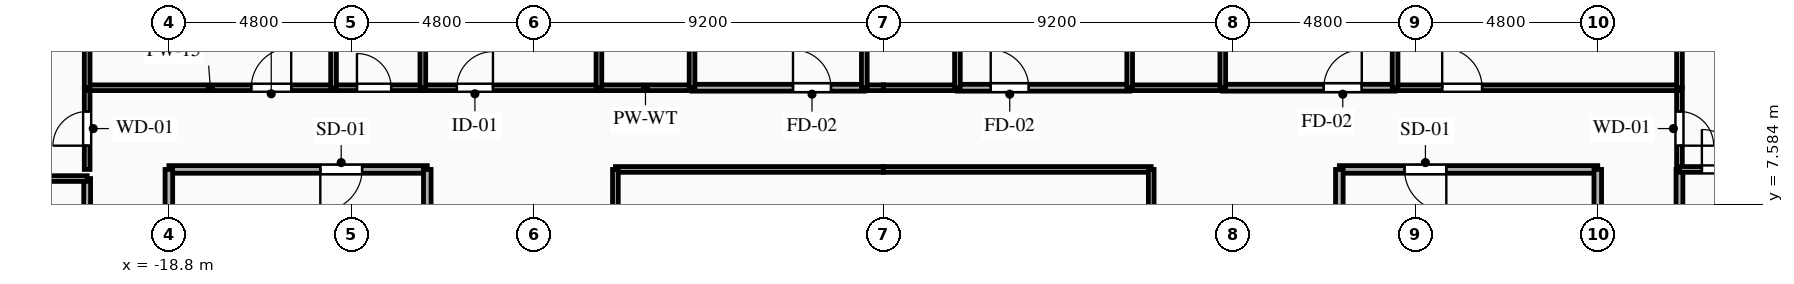
"""IFC4 building model, lengths in metres.
Left out: names, types, materials, properties, quantities, classifications, styles, units other than length and angle.
Written with IfcOpenShell. Run it as: python <this file> out.ifc"""

import sys

from ifc_helpers import new_model, si_unit, direction, frame, frame_2d, origin, place, context, subcontext, project, spatial, rectangle, extrude, element, fill, save


model = new_model("IFC4")
c1 = context("Model", 3, precision=1e-05, world=origin(), true_north=direction((0.0, 1.0)))
c2 = subcontext(c1, "Body", "Model", "MODEL_VIEW")
j1 = project(units=[si_unit("LENGTHUNIT", "METRE"), si_unit("PLANEANGLEUNIT", "RADIAN")], contexts=[c1])
p1 = place(None, origin())
s1 = spatial("IfcSite", under=j1, at=p1, CompositionType="ELEMENT")
p2 = place(p1, origin())
s2 = spatial("IfcBuilding", under=s1, at=p2, CompositionType="ELEMENT")
p3 = place(p2, frame((0.0, 0.0, 161.15)))
s3 = spatial("IfcBuildingStorey", under=s2, at=p3, CompositionType="ELEMENT", Elevation=161.15)
p4 = place(p3, frame((-12.0, 8.5, 0.0), z_axis=(0.0, 0.0, 1.0), x_axis=(-1.0, 0.0, 0.0)))
e1 = element("IfcWall", 1, at=p4, inside=s3, PredefinedType="PARTITIONING", context=c2, shape_type="SweptSolid", body=[
    extrude(rectangle(XDim=6.8, YDim=0.2, at=frame_2d((3.4, 0.0))), origin(), (0.0, 0.0, 1.0), 3.04),
])
p5 = place(p4, frame((1.715, 0.0, 0.0)))
e2 = element("IfcOpeningElement", 2, at=p5, cuts=e1, PredefinedType="OPENING", context=c2, shape_type="SweptSolid", body=[
    extrude(rectangle(XDim=1.1, YDim=2.15, at=frame_2d((0.55, 1.075))), frame((0.0, 0.11, 0.0), z_axis=(0.0, -1.0, 0.0), x_axis=(1.0, 0.0, 0.0)), (0.0, 0.0, 1.0), 0.22),
])
p6 = place(p3, frame((-18.8, 8.5, 0.0), z_axis=(0.0, 0.0, 1.0), x_axis=(0.0, -1.0, 0.0)))
e3 = element("IfcWall", 3, at=p6, inside=s3, PredefinedType="PARTITIONING", context=c2, shape_type="SweptSolid", body=[
    extrude(rectangle(XDim=2.9, YDim=0.2, at=frame_2d((1.45, 0.0))), origin(), (0.0, 0.0, 1.0), 2.525),
])
p7 = place(p3, frame((-12.0, 5.6, 0.0), z_axis=(0.0, 0.0, 1.0), x_axis=(0.0, 1.0, 0.0)))
e4 = element("IfcWall", 4, at=p7, inside=s3, PredefinedType="PARTITIONING", context=c2, shape_type="SweptSolid", body=[
    extrude(rectangle(XDim=2.9, YDim=0.2, at=frame_2d((1.45, 0.0))), origin(), (0.0, 0.0, 1.0), 3.04),
])
p8 = place(p3, frame((18.8, 8.5, 0.0), z_axis=(0.0, 0.0, 1.0), x_axis=(-1.0, 0.0, 0.0)))
e5 = element("IfcWall", 5, at=p8, inside=s3, PredefinedType="PARTITIONING", context=c2, shape_type="SweptSolid", body=[
    extrude(rectangle(XDim=6.8, YDim=0.2, at=frame_2d((3.4, 0.0))), origin(), (0.0, 0.0, 1.0), 3.04),
])
p9 = place(p8, frame((3.985, 0.0, 0.0)))
e6 = element("IfcOpeningElement", 6, at=p9, cuts=e5, PredefinedType="OPENING", context=c2, shape_type="SweptSolid", body=[
    extrude(rectangle(XDim=1.1, YDim=2.15, at=frame_2d((0.55, 1.075))), frame((0.0, 0.11, 0.0), z_axis=(0.0, -1.0, 0.0), x_axis=(1.0, 0.0, 0.0)), (0.0, 0.0, 1.0), 0.22),
])
p10 = place(p3, frame((18.8, 5.6, 0.0), z_axis=(0.0, 0.0, 1.0), x_axis=(0.0, 1.0, 0.0)))
e7 = element("IfcWall", 7, at=p10, inside=s3, PredefinedType="PARTITIONING", context=c2, shape_type="SweptSolid", body=[
    extrude(rectangle(XDim=2.9, YDim=0.2, at=frame_2d((1.45, 0.0))), origin(), (0.0, 0.0, 1.0), 2.525),
])
p11 = place(p3, frame((12.0, 8.5, 0.0), z_axis=(0.0, 0.0, 1.0), x_axis=(0.0, -1.0, 0.0)))
e8 = element("IfcWall", 8, at=p11, inside=s3, PredefinedType="PARTITIONING", context=c2, shape_type="SweptSolid", body=[
    extrude(rectangle(XDim=2.9, YDim=0.2, at=frame_2d((1.45, 0.0))), origin(), (0.0, 0.0, 1.0), 3.04),
])
p12 = place(p3, frame((-20.95, 8.5, 0.0), z_axis=(0.0, 0.0, 1.0), x_axis=(0.0, 1.0, 0.0)))
e9 = element("IfcWall", 9, at=p12, inside=s3, PredefinedType="PARTITIONING", context=c2, shape_type="SweptSolid", body=[
    extrude(rectangle(XDim=2.15, YDim=0.15, at=frame_2d((1.075, 0.0))), origin(), (0.0, 0.0, 1.0), 3.04),
])
p13 = place(p12, frame((0.625, 0.0, 0.0)))
e10 = element("IfcOpeningElement", 10, at=p13, cuts=e9, PredefinedType="OPENING", context=c2, shape_type="SweptSolid", body=[
    extrude(rectangle(XDim=0.9, YDim=2.1, at=frame_2d((0.45, 1.05))), frame((0.0, 0.085, 0.0), z_axis=(0.0, -1.0, 0.0), x_axis=(1.0, 0.0, 0.0)), (0.0, 0.0, 1.0), 0.17),
])
p14 = place(p3, frame((-20.95, 10.65, 0.0), z_axis=(0.0, 0.0, 1.0), x_axis=(1.0, 0.0, 0.0)))
e11 = element("IfcWall", 11, at=p14, inside=s3, PredefinedType="PARTITIONING", context=c2, shape_type="SweptSolid", body=[
    extrude(rectangle(XDim=6.483, YDim=0.15, at=frame_2d((3.241, 0.0))), origin(), (0.0, 0.0, 1.0), 3.04),
])
p15 = place(p14, frame((4.319, 0.0, 0.0)))
e12 = element("IfcOpeningElement", 12, at=p15, cuts=e11, PredefinedType="OPENING", context=c2, shape_type="SweptSolid", body=[
    extrude(rectangle(XDim=1.05, YDim=2.15, at=frame_2d((0.525, 1.075))), frame((0.0, 0.085, 0.0), z_axis=(0.0, -1.0, 0.0), x_axis=(1.0, 0.0, 0.0)), (0.0, 0.0, 1.0), 0.17),
])
p16 = place(p3, frame((-14.467, 10.65, 0.0), z_axis=(0.0, 0.0, 1.0), x_axis=(1.0, 0.0, 0.0)))
e13 = element("IfcWall", 13, at=p16, inside=s3, PredefinedType="PLUMBINGWALL", context=c2, shape_type="SweptSolid", body=[
    extrude(rectangle(XDim=2.35, YDim=0.15, at=frame_2d((1.175, 0.0))), origin(), (0.0, 0.0, 1.0), 3.04),
])
p17 = place(p16, frame((0.616, 0.0, 0.0)))
e14 = element("IfcOpeningElement", 14, at=p17, cuts=e13, PredefinedType="OPENING", context=c2, shape_type="SweptSolid", body=[
    extrude(rectangle(XDim=0.9, YDim=2.1, at=frame_2d((0.45, 1.05))), frame((0.0, 0.085, 0.0), z_axis=(0.0, -1.0, 0.0), x_axis=(1.0, 0.0, 0.0)), (0.0, 0.0, 1.0), 0.17),
])
p18 = place(p3, frame((-12.117, 10.65, 0.0), z_axis=(0.0, 0.0, 1.0), x_axis=(1.0, 0.0, 0.0)))
e15 = element("IfcWall", 15, at=p18, inside=s3, PredefinedType="PARTITIONING", context=c2, shape_type="SweptSolid", body=[
    extrude(rectangle(XDim=4.634, YDim=0.15, at=frame_2d((2.317, 0.0))), origin(), (0.0, 0.0, 1.0), 3.04),
])
p19 = place(p18, frame((0.896, 0.0, 0.0)))
e16 = element("IfcOpeningElement", 16, at=p19, cuts=e15, PredefinedType="OPENING", context=c2, shape_type="SweptSolid", body=[
    extrude(rectangle(XDim=0.95, YDim=2.1, at=frame_2d((0.475, 1.05))), frame((0.0, 0.085, 0.0), z_axis=(0.0, -1.0, 0.0), x_axis=(1.0, 0.0, 0.0)), (0.0, 0.0, 1.0), 0.17),
])
p20 = place(p3, frame((-5.033, 10.65, 0.0), z_axis=(0.0, 0.0, 1.0), x_axis=(1.0, 0.0, 0.0)))
e17 = element("IfcWall", 17, at=p20, inside=s3, PredefinedType="PARTITIONING", context=c2, shape_type="SweptSolid", body=[
    extrude(rectangle(XDim=4.533, YDim=0.18, at=frame_2d((2.267, 0.0))), origin(), (0.0, 0.0, 1.0), 3.04),
])
p21 = place(p20, frame((2.656, 0.0, 0.0)))
e18 = element("IfcOpeningElement", 18, at=p21, cuts=e17, PredefinedType="OPENING", context=c2, shape_type="SweptSolid", body=[
    extrude(rectangle(XDim=1.0, YDim=2.15, at=frame_2d((0.5, 1.075))), frame((0.0, 0.1, 0.0), z_axis=(0.0, -1.0, 0.0), x_axis=(1.0, 0.0, 0.0)), (0.0, 0.0, 1.0), 0.2),
])
p22 = place(p3, frame((-7.483, 10.65, 0.0), z_axis=(0.0, 0.0, 1.0), x_axis=(1.0, 0.0, 0.0)))
e19 = element("IfcWall", 19, at=p22, inside=s3, PredefinedType="PLUMBINGWALL", context=c2, shape_type="SweptSolid", body=[
    extrude(rectangle(XDim=2.45, YDim=0.15, at=frame_2d((1.225, 0.0))), origin(), (0.0, 0.0, 1.0), 3.04),
])
p23 = place(p3, frame((-0.5, 10.65, 0.0), z_axis=(0.0, 0.0, 1.0), x_axis=(1.0, 0.0, 0.0)))
e20 = element("IfcWall", 20, at=p23, inside=s3, PredefinedType="PLUMBINGWALL", context=c2, shape_type="SweptSolid", body=[
    extrude(rectangle(XDim=0.5, YDim=0.15, at=frame_2d((0.25, 0.0))), origin(), (0.0, 0.0, 1.0), 3.04),
])
p24 = place(p3, frame((0.0, 8.5, 0.0), z_axis=(0.0, 0.0, 1.0), x_axis=(-1.0, 0.0, 0.0)))
e21 = element("IfcWall", 21, at=p24, inside=s3, PredefinedType="PARTITIONING", context=c2, shape_type="SweptSolid", body=[
    extrude(rectangle(XDim=7.05, YDim=0.15, at=frame_2d((3.525, 0.0))), origin(), (0.0, 0.0, 1.0), 3.04),
])
p25 = place(p3, frame((20.95, 10.65, 0.0), z_axis=(0.0, 0.0, 1.0), x_axis=(0.0, -1.0, 0.0)))
e22 = element("IfcWall", 22, at=p25, inside=s3, PredefinedType="PARTITIONING", context=c2, shape_type="SweptSolid", body=[
    extrude(rectangle(XDim=2.15, YDim=0.15, at=frame_2d((1.075, 0.0))), origin(), (0.0, 0.0, 1.0), 3.04),
])
p26 = place(p25, frame((0.625, 0.0, 0.0)))
e23 = element("IfcOpeningElement", 23, at=p26, cuts=e22, PredefinedType="OPENING", context=c2, shape_type="SweptSolid", body=[
    extrude(rectangle(XDim=0.9, YDim=2.1, at=frame_2d((0.45, 1.05))), frame((0.0, 0.085, 0.0), z_axis=(0.0, -1.0, 0.0), x_axis=(1.0, 0.0, 0.0)), (0.0, 0.0, 1.0), 0.17),
])
p27 = place(p3, frame((1.95, 10.65, 0.0), z_axis=(0.0, 0.0, 1.0), x_axis=(1.0, 0.0, 0.0)))
e24 = element("IfcWall", 24, at=p27, inside=s3, PredefinedType="PARTITIONING", context=c2, shape_type="SweptSolid", body=[
    extrude(rectangle(XDim=4.533, YDim=0.18, at=frame_2d((2.267, 0.0))), origin(), (0.0, 0.0, 1.0), 3.04),
])
p28 = place(p27, frame((0.877, 0.0, 0.0)))
e25 = element("IfcOpeningElement", 25, at=p28, cuts=e24, PredefinedType="OPENING", context=c2, shape_type="SweptSolid", body=[
    extrude(rectangle(XDim=1.0, YDim=2.15, at=frame_2d((0.5, 1.075))), frame((0.0, 0.1, 0.0), z_axis=(0.0, -1.0, 0.0), x_axis=(1.0, 0.0, 0.0)), (0.0, 0.0, 1.0), 0.2),
])
p29 = place(p3, frame((0.0, 10.65, 0.0), z_axis=(0.0, 0.0, 1.0), x_axis=(1.0, 0.0, 0.0)))
e26 = element("IfcWall", 26, at=p29, inside=s3, PredefinedType="PLUMBINGWALL", context=c2, shape_type="SweptSolid", body=[
    extrude(rectangle(XDim=1.95, YDim=0.15, at=frame_2d((0.975, 0.0))), origin(), (0.0, 0.0, 1.0), 3.04),
])
p30 = place(p3, frame((8.933, 10.65, 0.0), z_axis=(0.0, 0.0, 1.0), x_axis=(1.0, 0.0, 0.0)))
e27 = element("IfcWall", 27, at=p30, inside=s3, PredefinedType="PARTITIONING", context=c2, shape_type="SweptSolid", body=[
    extrude(rectangle(XDim=4.534, YDim=0.18, at=frame_2d((2.267, 0.0))), origin(), (0.0, 0.0, 1.0), 3.04),
])
p31 = place(p30, frame((2.657, 0.0, 0.0)))
e28 = element("IfcOpeningElement", 28, at=p31, cuts=e27, PredefinedType="OPENING", context=c2, shape_type="SweptSolid", body=[
    extrude(rectangle(XDim=1.0, YDim=2.15, at=frame_2d((0.5, 1.075))), frame((0.0, 0.1, 0.0), z_axis=(0.0, -1.0, 0.0), x_axis=(1.0, 0.0, 0.0)), (0.0, 0.0, 1.0), 0.2),
])
p32 = place(p3, frame((6.483, 10.65, 0.0), z_axis=(0.0, 0.0, 1.0), x_axis=(1.0, 0.0, 0.0)))
e29 = element("IfcWall", 29, at=p32, inside=s3, PredefinedType="PLUMBINGWALL", context=c2, shape_type="SweptSolid", body=[
    extrude(rectangle(XDim=2.45, YDim=0.15, at=frame_2d((1.225, 0.0))), origin(), (0.0, 0.0, 1.0), 3.04),
])
p33 = place(p3, frame((13.467, 10.65, 0.0), z_axis=(0.0, 0.0, 1.0), x_axis=(1.0, 0.0, 0.0)))
e30 = element("IfcWall", 30, at=p33, inside=s3, PredefinedType="PARTITIONING", context=c2, shape_type="SweptSolid", body=[
    extrude(rectangle(XDim=7.483, YDim=0.15, at=frame_2d((3.741, 0.0))), origin(), (0.0, 0.0, 1.0), 3.04),
])
p34 = place(p33, frame((1.239, 0.0, 0.0)))
e31 = element("IfcOpeningElement", 31, at=p34, cuts=e30, PredefinedType="OPENING", context=c2, shape_type="SweptSolid", body=[
    extrude(rectangle(XDim=1.05, YDim=2.15, at=frame_2d((0.525, 1.075))), frame((0.0, 0.085, 0.0), z_axis=(0.0, -1.0, 0.0), x_axis=(1.0, 0.0, 0.0)), (0.0, 0.0, 1.0), 0.17),
])
p35 = place(p3, frame((7.05, 8.5, 0.0), z_axis=(0.0, 0.0, 1.0), x_axis=(-1.0, 0.0, 0.0)))
e32 = element("IfcWall", 32, at=p35, inside=s3, PredefinedType="PARTITIONING", context=c2, shape_type="SweptSolid", body=[
    extrude(rectangle(XDim=7.05, YDim=0.15, at=frame_2d((3.525, 0.0))), origin(), (0.0, 0.0, 1.0), 3.04),
])
p36 = place(p3, frame((-20.95, -1.31, 0.0), z_axis=(0.0, 0.0, 1.0), x_axis=(0.0, 1.0, 0.0)))
e33 = element("IfcWall", 33, at=p36, inside=s3, PredefinedType="PARTITIONING", context=c2, shape_type="SweptSolid", body=[
    extrude(rectangle(XDim=9.57, YDim=0.18, at=frame_2d((4.785, 0.0))), origin(), (0.0, 0.0, 1.0), 3.04),
])
p37 = place(p36, frame((1.506, 0.0, 0.0)))
e34 = element("IfcOpeningElement", 34, at=p37, cuts=e33, PredefinedType="OPENING", context=c2, shape_type="SweptSolid", body=[
    extrude(rectangle(XDim=1.0, YDim=2.15, at=frame_2d((0.5, 1.075))), frame((0.0, 0.1, 0.0), z_axis=(0.0, -1.0, 0.0), x_axis=(1.0, 0.0, 0.0)), (0.0, 0.0, 1.0), 0.2),
])
p38 = place(p3, frame((20.95, 8.5, 0.0), z_axis=(0.0, 0.0, 1.0), x_axis=(0.0, -1.0, 0.0)))
e35 = element("IfcWall", 35, at=p38, inside=s3, PredefinedType="PARTITIONING", context=c2, shape_type="SweptSolid", body=[
    extrude(rectangle(XDim=14.1, YDim=0.18, at=frame_2d((7.05, 0.0))), origin(), (0.0, 0.0, 1.0), 3.04),
])
p39 = place(p38, frame((8.042, 0.0, 0.0)))
e36 = element("IfcOpeningElement", 36, at=p39, cuts=e35, PredefinedType="OPENING", context=c2, shape_type="SweptSolid", body=[
    extrude(rectangle(XDim=1.0, YDim=2.15, at=frame_2d((0.5, 1.075))), frame((0.0, 0.1, 0.0), z_axis=(0.0, -1.0, 0.0), x_axis=(1.0, 0.0, 0.0)), (0.0, 0.0, 1.0), 0.2),
])
for number, where, z_axis, x_axis in (
    (37, (-7.05, 8.5, 0.0), (0.0, 0.0, 1.0), (0.0, -1.0, 0.0)),
    (38, (7.05, -0.8, 0.0), (0.0, 0.0, 1.0), (0.0, 1.0, 0.0)),
):
    element("IfcWall", number, at=place(p3, frame(where, z_axis=z_axis, x_axis=x_axis)), inside=s3, PredefinedType="PARTITIONING", context=c2, shape_type="SweptSolid", body=[
        extrude(rectangle(XDim=9.3, YDim=0.15, at=frame_2d((4.65, 0.0))), origin(), (0.0, 0.0, 1.0), 3.04),
    ])
p40 = place(p3, frame((-24.765, 8.26, 0.0), z_axis=(0.0, 0.0, 1.0), x_axis=(1.0, 0.0, 0.0)))
e39 = element("IfcWall", 39, at=p40, inside=s3, PredefinedType="PARTITIONING", context=c2, shape_type="SweptSolid", body=[
    extrude(rectangle(XDim=3.815, YDim=0.15, at=frame_2d((1.907, 0.0))), origin(), (0.0, 0.0, 1.0), 3.04),
])
p41 = place(p3, frame((-20.95, 20.4, 0.0), z_axis=(0.0, 0.0, 1.0), x_axis=(0.0, -1.0, 0.0)))
e40 = element("IfcWall", 40, at=p41, inside=s3, PredefinedType="PARTITIONING", context=c2, shape_type="SweptSolid", body=[
    extrude(rectangle(XDim=9.75, YDim=0.15, at=frame_2d((4.875, 0.0))), origin(), (0.0, 0.0, 1.0), 3.04),
])
p42 = place(p3, frame((20.95, 8.5, 0.0), z_axis=(0.0, 0.0, 1.0), x_axis=(1.0, 0.0, 0.0)))
e41 = element("IfcWall", 41, at=p42, inside=s3, PredefinedType="PARTITIONING", context=c2, shape_type="SweptSolid", body=[
    extrude(rectangle(XDim=2.23, YDim=0.15, at=frame_2d((1.115, 0.0))), origin(), (0.0, 0.0, 1.0), 3.04),
])
p43 = place(p42, frame((0.59, 0.0, 0.0)))
e42 = element("IfcOpeningElement", 42, at=p43, cuts=e41, PredefinedType="OPENING", context=c2, shape_type="SweptSolid", body=[
    extrude(rectangle(XDim=1.05, YDim=2.15, at=frame_2d((0.525, 1.075))), frame((0.0, 0.085, 0.0), z_axis=(0.0, -1.0, 0.0), x_axis=(1.0, 0.0, 0.0)), (0.0, 0.0, 1.0), 0.17),
])
p44 = place(p3, frame((20.95, 10.65, 0.0), z_axis=(0.0, 0.0, 1.0), x_axis=(0.0, 1.0, 0.0)))
e43 = element("IfcWall", 43, at=p44, inside=s3, PredefinedType="PARTITIONING", context=c2, shape_type="SweptSolid", body=[
    extrude(rectangle(XDim=9.75, YDim=0.15, at=frame_2d((4.875, 0.0))), origin(), (0.0, 0.0, 1.0), 2.525),
])
for number, where, z_axis, x_axis in (
    (44, (-14.467, 20.4, 0.0), (0.0, 0.0, 1.0), (0.0, -1.0, 0.0)),
    (45, (-12.117, 20.4, 0.0), (0.0, 0.0, 1.0), (0.0, -1.0, 0.0)),
):
    element("IfcWall", number, at=place(p3, frame(where, z_axis=z_axis, x_axis=x_axis)), inside=s3, PredefinedType="PLUMBINGWALL", context=c2, shape_type="SweptSolid", body=[
        extrude(rectangle(XDim=9.75, YDim=0.15, at=frame_2d((4.875, 0.0))), origin(), (0.0, 0.0, 1.0), 3.04),
    ])
for number, where, z_axis, x_axis in (
    (46, (-7.483, 12.8, 0.0), (0.0, 0.0, 1.0), (0.0, -1.0, 0.0)),
    (47, (-5.033, 10.65, 0.0), (0.0, 0.0, 1.0), (0.0, 1.0, 0.0)),
    (48, (-0.5, 12.8, 0.0), (0.0, 0.0, 1.0), (0.0, -1.0, 0.0)),
    (49, (1.95, 10.65, 0.0), (0.0, 0.0, 1.0), (0.0, 1.0, 0.0)),
    (50, (6.483, 12.8, 0.0), (0.0, 0.0, 1.0), (0.0, -1.0, 0.0)),
    (51, (8.933, 10.65, 0.0), (0.0, 0.0, 1.0), (0.0, 1.0, 0.0)),
):
    element("IfcWall", number, at=place(p3, frame(where, z_axis=z_axis, x_axis=x_axis)), inside=s3, PredefinedType="PLUMBINGWALL", context=c2, shape_type="SweptSolid", body=[
        extrude(rectangle(XDim=2.15, YDim=0.15, at=frame_2d((1.075, 0.0))), origin(), (0.0, 0.0, 1.0), 3.04),
    ])
p45 = place(p3, frame((13.467, 20.4, 0.0), z_axis=(0.0, 0.0, 1.0), x_axis=(0.0, -1.0, 0.0)))
e52 = element("IfcWall", 52, at=p45, inside=s3, PredefinedType="PARTITIONING", context=c2, shape_type="SweptSolid", body=[
    extrude(rectangle(XDim=9.75, YDim=0.15, at=frame_2d((4.875, 0.0))), origin(), (0.0, 0.0, 1.0), 3.04),
])
p46 = place(p5, origin())
e53 = element("IfcDoor", 53, at=p46, inside=s3, OperationType="SINGLE_SWING_RIGHT", PredefinedType="DOOR", context=c2, shape_type="SweptSolid", body=[
    extrude(rectangle(XDim=1.1, YDim=2.15, at=frame_2d((0.55, 1.075))), frame((0.0, 0.025, 0.0), z_axis=(0.0, -1.0, 0.0), x_axis=(1.0, 0.0, 0.0)), (0.0, 0.0, 1.0), 0.05),
])
fill(e2, e53)
p47 = place(p9, origin())
e54 = element("IfcDoor", 54, at=p47, inside=s3, OperationType="SINGLE_SWING_LEFT", PredefinedType="DOOR", context=c2, shape_type="SweptSolid", body=[
    extrude(rectangle(XDim=1.1, YDim=2.15, at=frame_2d((0.55, 1.075))), frame((0.0, 0.025, 0.0), z_axis=(0.0, -1.0, 0.0), x_axis=(1.0, 0.0, 0.0)), (0.0, 0.0, 1.0), 0.05),
])
fill(e6, e54)
p48 = place(p13, origin())
e55 = element("IfcDoor", 55, at=p48, inside=s3, OperationType="SINGLE_SWING_LEFT", PredefinedType="DOOR", context=c2, shape_type="SweptSolid", body=[
    extrude(rectangle(XDim=0.9, YDim=2.1, at=frame_2d((0.45, 1.05))), frame((0.0, 0.025, 0.0), z_axis=(0.0, -1.0, 0.0), x_axis=(1.0, 0.0, 0.0)), (0.0, 0.0, 1.0), 0.05),
])
fill(e10, e55)
p49 = place(p15, origin())
e56 = element("IfcDoor", 56, at=p49, inside=s3, OperationType="SINGLE_SWING_RIGHT", PredefinedType="DOOR", context=c2, shape_type="SweptSolid", body=[
    extrude(rectangle(XDim=1.05, YDim=2.15, at=frame_2d((0.525, 1.075))), frame((0.0, 0.025, 0.0), z_axis=(0.0, -1.0, 0.0), x_axis=(1.0, 0.0, 0.0)), (0.0, 0.0, 1.0), 0.05),
])
fill(e12, e56)
p50 = place(p17, origin())
e57 = element("IfcDoor", 57, at=p50, inside=s3, OperationType="SINGLE_SWING_LEFT", PredefinedType="DOOR", context=c2, shape_type="SweptSolid", body=[
    extrude(rectangle(XDim=0.9, YDim=2.1, at=frame_2d((0.45, 1.05))), frame((0.0, 0.025, 0.0), z_axis=(0.0, -1.0, 0.0), x_axis=(1.0, 0.0, 0.0)), (0.0, 0.0, 1.0), 0.05),
])
fill(e14, e57)
p51 = place(p19, origin())
e58 = element("IfcDoor", 58, at=p51, inside=s3, OperationType="SINGLE_SWING_RIGHT", PredefinedType="DOOR", context=c2, shape_type="SweptSolid", body=[
    extrude(rectangle(XDim=0.95, YDim=2.1, at=frame_2d((0.475, 1.05))), frame((0.0, 0.025, 0.0), z_axis=(0.0, -1.0, 0.0), x_axis=(1.0, 0.0, 0.0)), (0.0, 0.0, 1.0), 0.05),
])
fill(e16, e58)
p52 = place(p21, origin())
e59 = element("IfcDoor", 59, at=p52, inside=s3, OperationType="SINGLE_SWING_LEFT", PredefinedType="DOOR", context=c2, shape_type="SweptSolid", body=[
    extrude(rectangle(XDim=1.0, YDim=2.15, at=frame_2d((0.5, 1.075))), frame((0.0, 0.025, 0.0), z_axis=(0.0, -1.0, 0.0), x_axis=(1.0, 0.0, 0.0)), (0.0, 0.0, 1.0), 0.05),
])
fill(e18, e59)
p53 = place(p26, origin())
e60 = element("IfcDoor", 60, at=p53, inside=s3, OperationType="SINGLE_SWING_RIGHT", PredefinedType="DOOR", context=c2, shape_type="SweptSolid", body=[
    extrude(rectangle(XDim=0.9, YDim=2.1, at=frame_2d((0.45, 1.05))), frame((0.0, 0.025, 0.0), z_axis=(0.0, -1.0, 0.0), x_axis=(1.0, 0.0, 0.0)), (0.0, 0.0, 1.0), 0.05),
])
fill(e23, e60)
p54 = place(p28, origin())
e61 = element("IfcDoor", 61, at=p54, inside=s3, OperationType="SINGLE_SWING_LEFT", PredefinedType="DOOR", context=c2, shape_type="SweptSolid", body=[
    extrude(rectangle(XDim=1.0, YDim=2.15, at=frame_2d((0.5, 1.075))), frame((0.0, 0.025, 0.0), z_axis=(0.0, -1.0, 0.0), x_axis=(1.0, 0.0, 0.0)), (0.0, 0.0, 1.0), 0.05),
])
fill(e25, e61)
p55 = place(p31, origin())
e62 = element("IfcDoor", 62, at=p55, inside=s3, OperationType="SINGLE_SWING_RIGHT", PredefinedType="DOOR", context=c2, shape_type="SweptSolid", body=[
    extrude(rectangle(XDim=1.0, YDim=2.15, at=frame_2d((0.5, 1.075))), frame((0.0, 0.025, 0.0), z_axis=(0.0, -1.0, 0.0), x_axis=(1.0, 0.0, 0.0)), (0.0, 0.0, 1.0), 0.05),
])
fill(e28, e62)
p56 = place(p34, origin())
e63 = element("IfcDoor", 63, at=p56, inside=s3, OperationType="SINGLE_SWING_LEFT", PredefinedType="DOOR", context=c2, shape_type="SweptSolid", body=[
    extrude(rectangle(XDim=1.05, YDim=2.15, at=frame_2d((0.525, 1.075))), frame((0.0, 0.025, 0.0), z_axis=(0.0, -1.0, 0.0), x_axis=(1.0, 0.0, 0.0)), (0.0, 0.0, 1.0), 0.05),
])
fill(e31, e63)
p57 = place(p43, origin())
e64 = element("IfcDoor", 64, at=p57, inside=s3, OperationType="SINGLE_SWING_LEFT", PredefinedType="DOOR", context=c2, shape_type="SweptSolid", body=[
    extrude(rectangle(XDim=1.05, YDim=2.15, at=frame_2d((0.525, 1.075))), frame((0.0, 0.025, 0.0), z_axis=(0.0, -1.0, 0.0), x_axis=(1.0, 0.0, 0.0)), (0.0, 0.0, 1.0), 0.05),
])
fill(e42, e64)
save(model, sys.argv[1])
